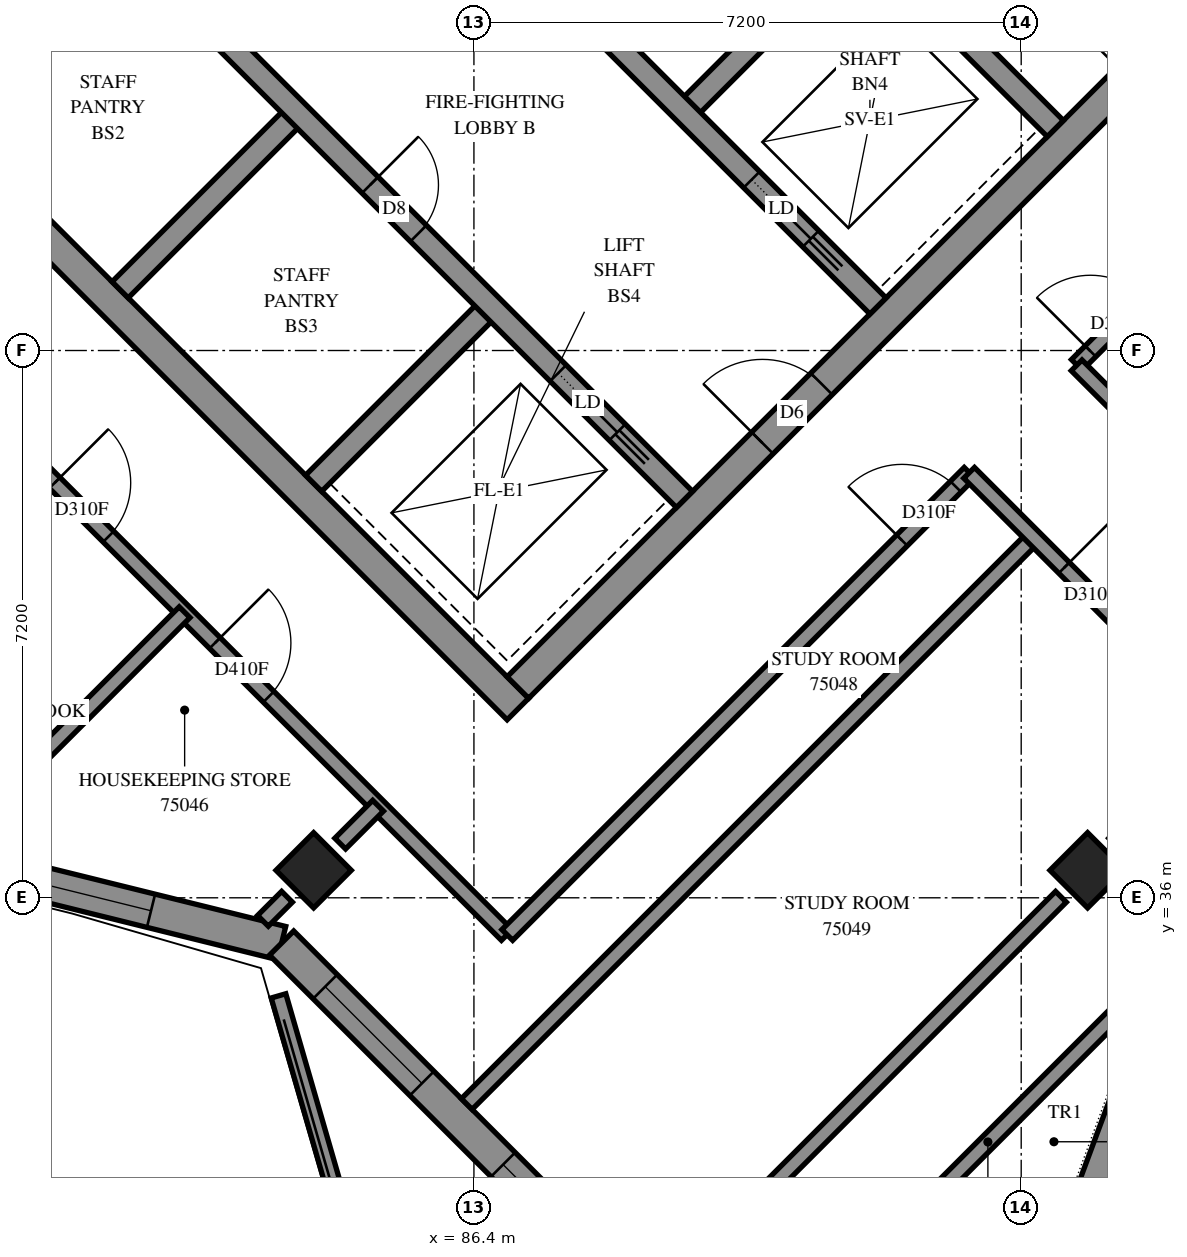
"""IFC4 building model, lengths in metres.
Left out: names, types, materials, properties, quantities, classifications, styles, units other than length and angle.
Written with IfcOpenShell. Run it as: python <this file> out.ifc"""

import sys

from ifc_helpers import new_model, si_unit, direction, frame, frame_2d, origin, origin_2d, place, context, subcontext, project, spatial, polyline, rectangle, outline, extrude, element, fill, save


model = new_model("IFC4")
c1 = context("Model", 3, precision=1e-05, world=origin(), true_north=direction((0.0, 1.0)))
c2 = subcontext(c1, "Body", "Model", "MODEL_VIEW")
j1 = project(units=[si_unit("LENGTHUNIT", "METRE"), si_unit("PLANEANGLEUNIT", "RADIAN")], contexts=[c1])
p1 = place(None, origin())
s1 = spatial("IfcSite", under=j1, at=p1, CompositionType="ELEMENT")
p2 = place(p1, origin())
s2 = spatial("IfcBuilding", under=s1, at=p2, CompositionType="ELEMENT")
p3 = place(p2, frame((0.0, 0.0, 274.4)))
s3 = spatial("IfcBuildingStorey", under=s2, at=p3, CompositionType="ELEMENT", Elevation=274.4)
for number, where, z_axis, x_axis in (
    (1, (84.291, 36.362, 0.0), (0.0, 0.0, 1.0), (0.707, -0.707, 0.0)),
    (2, (94.474, 36.362, 0.0), (0.0, 0.0, 1.0), (0.707, -0.707, 0.0)),
):
    element("IfcColumn", number, at=place(p3, frame(where, z_axis=z_axis, x_axis=x_axis)), inside=s3, PredefinedType="COLUMN", context=c2, shape_type="SweptSolid", body=[
        extrude(rectangle(XDim=0.7, YDim=0.7, at=origin_2d()), origin(), (0.0, 0.0, 1.0), 3.1),
    ])
p4 = place(p3, frame((76.23, 49.231, -0.3), z_axis=(0.0, 0.0, 1.0), x_axis=(0.7071034917, -0.7071100706, 0.0)))
e3 = element("IfcWall", 3, at=p4, inside=s3, PredefinedType="SHEAR", context=c2, shape_type="SweptSolid", body=[
    extrude(rectangle(XDim=15.2, YDim=0.4, at=frame_2d((7.6, 0.0))), origin(), (0.0, 0.0, 1.0), 2.7),
])
p5 = place(p3, frame((86.978, 38.766, -0.3), z_axis=(0.0, 0.0, 1.0), x_axis=(0.7071067812, 0.7071067812, 0.0)))
e4 = element("IfcWall", 4, at=p5, inside=s3, PredefinedType="SHEAR", context=c2, shape_type="SweptSolid", body=[
    extrude(rectangle(XDim=14.4, YDim=0.4, at=frame_2d((7.2, 0.0))), origin(), (0.0, 0.0, 1.0), 2.7),
])
p6 = place(p5, frame((4.55, 0.0, 0.3)))
e5 = element("IfcOpeningElement", 5, at=p6, cuts=e4, PredefinedType="OPENING", context=c2, shape_type="SweptSolid", body=[
    extrude(rectangle(XDim=1.1, YDim=2.1, at=frame_2d((0.55, 1.05))), frame((0.0, 0.21, 0.0), z_axis=(0.0, -1.0, 0.0), x_axis=(1.0, 0.0, 0.0)), (0.0, 0.0, 1.0), 0.42),
])
p7 = place(p5, frame((11.35, 0.0, 0.3)))
e6 = element("IfcOpeningElement", 6, at=p7, cuts=e4, PredefinedType="OPENING", context=c2, shape_type="SweptSolid", body=[
    extrude(rectangle(XDim=1.1, YDim=2.1, at=frame_2d((0.55, 1.05))), frame((0.0, 0.21, 0.0), z_axis=(0.0, -1.0, 0.0), x_axis=(1.0, 0.0, 0.0)), (0.0, 0.0, 1.0), 0.42),
])
p8 = place(p3, frame((79.2, 46.544, 0.0), z_axis=(0.0, 0.0, 1.0), x_axis=(0.7071219326, 0.7070916295, 0.0)))
e7 = element("IfcWall", 7, at=p8, inside=s3, PredefinedType="SOLIDWALL", context=c2, shape_type="SweptSolid", body=[
    extrude(rectangle(XDim=3.3, YDim=0.3, at=frame_2d((1.65, 0.0))), origin(), (0.0, 0.0, 1.0), 3.1),
])
for number, where, z_axis, x_axis in (
    (8, (81.746, 43.999, 0.0), (0.0, 0.0, 1.0), (0.707, 0.707, 0.0)),
    (9, (84.291, 41.453, 0.0), (0.0, 0.0, 1.0), (0.707, 0.707, 0.0)),
):
    element("IfcWall", number, at=place(p3, frame(where, z_axis=z_axis, x_axis=x_axis)), inside=s3, PredefinedType="SOLIDWALL", context=c2, shape_type="SweptSolid", body=[
        extrude(rectangle(XDim=3.3, YDim=0.3, at=frame_2d((1.65, 0.0))), origin(), (0.0, 0.0, 1.0), 3.1),
    ])
p9 = place(p3, frame((89.17, 46.332, 0.0), z_axis=(0.0, 0.0, 1.0), x_axis=(0.7071067812, 0.7071067812, 0.0)))
e10 = element("IfcWall", 10, at=p9, inside=s3, PredefinedType="SOLIDWALL", context=c2, shape_type="SweptSolid", body=[
    extrude(rectangle(XDim=3.3, YDim=0.3, at=frame_2d((1.65, 0.0))), origin(), (0.0, 0.0, 1.0), 3.1),
])
p10 = place(p3, frame((78.988, 51.423, 0.0), z_axis=(0.0, 0.0, 1.0), x_axis=(0.7071067812, -0.7071067812, 0.0)))
e11 = element("IfcWall", 11, at=p10, inside=s3, PredefinedType="SOLIDWALL", context=c2, shape_type="SweptSolid", body=[
    extrude(rectangle(XDim=14.4, YDim=0.3, at=frame_2d((7.2, 0.0))), origin(), (0.0, 0.0, 1.0), 3.1),
])
p11 = place(p10, frame((1.35, 0.0, 0.0)))
e12 = element("IfcOpeningElement", 12, at=p11, cuts=e11, PredefinedType="OPENING", context=c2, shape_type="SweptSolid", body=[
    extrude(rectangle(XDim=0.9, YDim=2.1, at=frame_2d((0.45, 1.05))), frame((0.0, 0.16, 0.0), z_axis=(0.0, -1.0, 0.0), x_axis=(1.0, 0.0, 0.0)), (0.0, 0.0, 1.0), 0.32),
])
p12 = place(p10, frame((4.95, 0.0, 0.0)))
e13 = element("IfcOpeningElement", 13, at=p12, cuts=e11, PredefinedType="OPENING", context=c2, shape_type="SweptSolid", body=[
    extrude(rectangle(XDim=0.9, YDim=2.1, at=frame_2d((0.45, 1.05))), frame((0.0, 0.16, 0.0), z_axis=(0.0, -1.0, 0.0), x_axis=(1.0, 0.0, 0.0)), (0.0, 0.0, 1.0), 0.32),
])
p13 = place(p10, frame((8.55, 0.0, 0.0)))
e14 = element("IfcOpeningElement", 14, at=p13, cuts=e11, PredefinedType="OPENING", context=c2, shape_type="SweptSolid", body=[
    extrude(rectangle(XDim=0.9, YDim=2.1, at=frame_2d((0.45, 1.05))), frame((0.0, 0.16, 0.0), z_axis=(0.0, -1.0, 0.0), x_axis=(1.0, 0.0, 0.0)), (0.0, 0.0, 1.0), 0.32),
])
p14 = place(p10, frame((12.05, 0.0, 0.0)))
e15 = element("IfcOpeningElement", 15, at=p14, cuts=e11, PredefinedType="OPENING", context=c2, shape_type="SweptSolid", body=[
    extrude(rectangle(XDim=1.1, YDim=2.1, at=frame_2d((0.55, 1.05))), frame((0.0, 0.16, 0.0), z_axis=(0.0, -1.0, 0.0), x_axis=(1.0, 0.0, 0.0)), (0.0, 0.0, 1.0), 0.32),
])
p15 = place(p3, frame((81.534, 53.969, 0.0), z_axis=(0.0, 0.0, 1.0), x_axis=(0.707103309, -0.7071102534, 0.0)))
e16 = element("IfcWall", 16, at=p15, inside=s3, PredefinedType="SOLIDWALL", context=c2, shape_type="SweptSolid", body=[
    extrude(rectangle(XDim=14.4, YDim=0.3, at=frame_2d((7.2, 0.0))), origin(), (0.0, 0.0, 1.0), 3.1),
])
p16 = place(p15, frame((8.55, 0.0, 0.0)))
e17 = element("IfcOpeningElement", 17, at=p16, cuts=e16, PredefinedType="OPENING", context=c2, shape_type="SweptSolid", body=[
    extrude(rectangle(XDim=0.9, YDim=2.1, at=frame_2d((0.45, 1.05))), frame((0.0, 0.16, 0.0), z_axis=(0.0, -1.0, 0.0), x_axis=(1.0, 0.0, 0.0)), (0.0, 0.0, 1.0), 0.32),
])
p17 = place(p15, frame((1.25, 0.0, 0.0)))
e18 = element("IfcOpeningElement", 18, at=p17, cuts=e16, PredefinedType="OPENING", context=c2, shape_type="SweptSolid", body=[
    extrude(rectangle(XDim=1.1, YDim=2.1, at=frame_2d((0.55, 1.05))), frame((0.0, 0.16, 0.0), z_axis=(0.0, -1.0, 0.0), x_axis=(1.0, 0.0, 0.0)), (0.0, 0.0, 1.0), 0.32),
])
p18 = place(p15, frame((4.85, 0.0, 0.0)))
e19 = element("IfcOpeningElement", 19, at=p18, cuts=e16, PredefinedType="OPENING", context=c2, shape_type="SweptSolid", body=[
    extrude(rectangle(XDim=1.1, YDim=2.1, at=frame_2d((0.55, 1.05))), frame((0.0, 0.16, 0.0), z_axis=(0.0, -1.0, 0.0), x_axis=(1.0, 0.0, 0.0)), (0.0, 0.0, 1.0), 0.32),
])
p19 = place(p15, frame((12.05, 0.0, 0.0)))
e20 = element("IfcOpeningElement", 20, at=p19, cuts=e16, PredefinedType="OPENING", context=c2, shape_type="SweptSolid", body=[
    extrude(rectangle(XDim=1.1, YDim=2.1, at=frame_2d((0.55, 1.05))), frame((0.0, 0.16, 0.0), z_axis=(0.0, -1.0, 0.0), x_axis=(1.0, 0.0, 0.0)), (0.0, 0.0, 1.0), 0.32),
])
p20 = place(p3, frame((88.958, 51.211, 0.0), z_axis=(0.0, 0.0, 1.0), x_axis=(0.7070998367, -0.7071137256, 0.0)))
e21 = element("IfcWall", 21, at=p20, inside=s3, PredefinedType="SOLIDWALL", context=c2, shape_type="SweptSolid", body=[
    extrude(rectangle(XDim=7.2, YDim=0.3, at=frame_2d((3.6, 0.0))), origin(), (0.0, 0.0, 1.0), 3.1),
])
p21 = place(p3, frame((94.3, 31.45, 0.0), z_axis=(0.0, 0.0, 1.0), x_axis=(0.3481927166, 0.9374229739, 0.0)))
e22 = element("IfcWall", 22, at=p21, inside=s3, PredefinedType="SOLIDWALL", context=c2, shape_type="SweptSolid", body=[
    extrude(outline(polyline([(-0.108, -0.225), (5.172, -0.225), (5.379, 0.225), (0.108, 0.225), (-0.108, -0.225)])), origin(), (0.0, 0.0, 1.0), 3.1),
])
p22 = place(p21, frame((2.034, 0.0, 0.7)))
e23 = element("IfcOpeningElement", 23, at=p22, cuts=e22, PredefinedType="OPENING", context=c2, shape_type="SweptSolid", body=[
    extrude(rectangle(XDim=1.8, YDim=1.8, at=frame_2d((0.9, 0.9))), frame((0.0, 0.235, 0.0), z_axis=(0.0, -1.0, 0.0), x_axis=(1.0, 0.0, 0.0)), (0.0, 0.0, 1.0), 0.47),
])
p23 = place(p3, frame((79.43, 36.503, 0.0), z_axis=(0.0, 0.0, 1.0), x_axis=(0.9707070317, -0.2402662245, 0.0)))
e24 = element("IfcWall", 24, at=p23, inside=s3, PredefinedType="SOLIDWALL", context=c2, shape_type="SweptSolid", body=[
    extrude(outline(polyline([(-0.136, -0.225), (4.511, -0.225), (4.636, 0.225), (0.136, 0.225), (-0.136, -0.225)])), origin(), (0.0, 0.0, 1.0), 2.6),
])
p24 = place(p23, frame((1.004, 0.0, 0.6)))
e25 = element("IfcOpeningElement", 25, at=p24, cuts=e24, PredefinedType="OPENING", context=c2, shape_type="SweptSolid", body=[
    extrude(rectangle(XDim=1.8, YDim=1.9, at=frame_2d((0.9, 0.95))), frame((0.0, 0.235, 0.0), z_axis=(0.0, -1.0, 0.0), x_axis=(1.0, 0.0, 0.0)), (0.0, 0.0, 1.0), 0.47),
])
p25 = place(p3, frame((83.87, 35.404, 0.0), z_axis=(0.0, 0.0, 1.0), x_axis=(0.7071067812, -0.7071067812, 0.0)))
e26 = element("IfcWall", 26, at=p25, inside=s3, PredefinedType="SOLIDWALL", context=c2, shape_type="SweptSolid", body=[
    extrude(outline(polyline([(0.063, -0.225), (8.021, -0.225), (7.743, 0.225), (-0.063, 0.225), (0.063, -0.225)])), origin(), (0.0, 0.0, 1.0), 3.1),
])
p26 = place(p25, frame((0.81, 0.0, 0.7)))
e27 = element("IfcOpeningElement", 27, at=p26, cuts=e26, PredefinedType="OPENING", context=c2, shape_type="SweptSolid", body=[
    extrude(rectangle(XDim=1.8, YDim=1.8, at=frame_2d((0.9, 0.9))), frame((0.0, 0.235, 0.0), z_axis=(0.0, -1.0, 0.0), x_axis=(1.0, 0.0, 0.0)), (0.0, 0.0, 1.0), 0.47),
])
p27 = place(p25, frame((4.121, 0.0, 0.7)))
e28 = element("IfcOpeningElement", 28, at=p27, cuts=e26, PredefinedType="OPENING", context=c2, shape_type="SweptSolid", body=[
    extrude(rectangle(XDim=1.8, YDim=1.8, at=frame_2d((0.9, 0.9))), frame((0.0, 0.235, 0.0), z_axis=(0.0, -1.0, 0.0), x_axis=(1.0, 0.0, 0.0)), (0.0, 0.0, 1.0), 0.47),
])
p28 = place(p3, frame((95.381, 35.007, 0.0), z_axis=(0.0, 0.0, 1.0), x_axis=(-0.7071067812, -0.7071067812, 0.0)))
e29 = element("IfcWall", 29, at=p28, inside=s3, PredefinedType="PARAPET", context=c2, shape_type="SweptSolid", body=[
    extrude(outline(polyline([(0.0, -0.1), (6.277, -0.1), (6.277, 0.1), (0.0, 0.1), (0.0, -0.1)])), origin(), (0.0, 0.0, 1.0), 0.25),
])
p29 = place(p3, frame((86.306, 33.287, 0.0), z_axis=(0.0, 0.0, 1.0), x_axis=(0.7071020418, 0.7071115206, 0.0)))
e30 = element("IfcWall", 30, at=p29, inside=s3, PredefinedType="PARTITIONING", context=c2, shape_type="SweptSolid", body=[
    extrude(rectangle(XDim=10.55, YDim=0.2, at=frame_2d((5.275, 0.0))), origin(), (0.0, 0.0, 1.0), 3.1),
])
p30 = place(p3, frame((80.747, 41.597, 0.0), z_axis=(0.0, 0.0, 1.0), x_axis=(0.7071067812, -0.7071067812, 0.0)))
e31 = element("IfcWall", 31, at=p30, inside=s3, PredefinedType="PARTITIONING", context=c2, shape_type="SweptSolid", body=[
    extrude(rectangle(XDim=8.607, YDim=0.2, at=frame_2d((4.303, 0.0))), origin(), (0.0, 0.0, 1.0), 3.1),
])
p31 = place(p30, frame((0.195, 0.0, 0.0)))
e32 = element("IfcOpeningElement", 32, at=p31, cuts=e31, PredefinedType="OPENING", context=c2, shape_type="SweptSolid", body=[
    extrude(rectangle(XDim=1.0, YDim=2.1, at=frame_2d((0.5, 1.05))), frame((0.0, 0.11, 0.0), z_axis=(0.0, -1.0, 0.0), x_axis=(1.0, 0.0, 0.0)), (0.0, 0.0, 1.0), 0.22),
])
p32 = place(p30, frame((3.175, 0.0, 0.0)))
e33 = element("IfcOpeningElement", 33, at=p32, cuts=e31, PredefinedType="OPENING", context=c2, shape_type="SweptSolid", body=[
    extrude(rectangle(XDim=1.0, YDim=2.1, at=frame_2d((0.5, 1.05))), frame((0.0, 0.11, 0.0), z_axis=(0.0, -1.0, 0.0), x_axis=(1.0, 0.0, 0.0)), (0.0, 0.0, 1.0), 0.22),
])
p33 = place(p3, frame((86.839, 35.511, 0.0), z_axis=(0.0, 0.0, 1.0), x_axis=(0.707223053, 0.7069904903, 0.0)))
e34 = element("IfcWall", 34, at=p33, inside=s3, PredefinedType="PARTITIONING", context=c2, shape_type="SweptSolid", body=[
    extrude(rectangle(XDim=8.6, YDim=0.2, at=frame_2d((4.3, 0.0))), origin(), (0.0, 0.0, 1.0), 3.1),
])
p34 = place(p33, frame((7.343, 0.0, 0.0)))
e35 = element("IfcOpeningElement", 35, at=p34, cuts=e34, PredefinedType="OPENING", context=c2, shape_type="SweptSolid", body=[
    extrude(rectangle(XDim=1.0, YDim=2.1, at=frame_2d((0.5, 1.05))), frame((0.0, 0.11, 0.0), z_axis=(0.0, -1.0, 0.0), x_axis=(1.0, 0.0, 0.0)), (0.0, 0.0, 1.0), 0.22),
])
p35 = place(p3, frame((94.332, 43.01, 0.0), z_axis=(0.0, 0.0, 1.0), x_axis=(0.7071067812, 0.7071067812, 0.0)))
e36 = element("IfcWall", 36, at=p35, inside=s3, PredefinedType="PARTITIONING", context=c2, shape_type="SweptSolid", body=[
    extrude(rectangle(XDim=8.598, YDim=0.2, at=frame_2d((4.299, 0.0))), origin(), (0.0, 0.0, 1.0), 3.1),
])
p36 = place(p35, frame((0.255, 0.0, 0.0)))
e37 = element("IfcOpeningElement", 37, at=p36, cuts=e36, PredefinedType="OPENING", context=c2, shape_type="SweptSolid", body=[
    extrude(rectangle(XDim=1.0, YDim=2.1, at=frame_2d((0.5, 1.05))), frame((0.0, 0.11, 0.0), z_axis=(0.0, -1.0, 0.0), x_axis=(1.0, 0.0, 0.0)), (0.0, 0.0, 1.0), 0.22),
])
p37 = place(p3, frame((89.731, 31.621, 0.0), z_axis=(0.0, 0.0, 1.0), x_axis=(0.7071067812, 0.7071067812, 0.0)))
e38 = element("IfcWall", 38, at=p37, inside=s3, PredefinedType="PARTITIONING", context=c2, shape_type="SweptSolid", body=[
    extrude(rectangle(XDim=6.211, YDim=0.2, at=frame_2d((3.106, 0.0))), origin(), (0.0, 0.0, 1.0), 2.6),
])
p38 = place(p3, frame((92.915, 41.591, 0.0), z_axis=(0.0, 0.0, 1.0), x_axis=(0.7071067812, -0.7071067812, 0.0)))
e39 = element("IfcWall", 39, at=p38, inside=s3, PredefinedType="PARTITIONING", context=c2, shape_type="SweptSolid", body=[
    extrude(rectangle(XDim=4.8, YDim=0.2, at=frame_2d((2.4, 0.0))), origin(), (0.0, 0.0, 1.0), 3.1),
])
p39 = place(p38, frame((1.767, 0.0, 0.0)))
e40 = element("IfcOpeningElement", 40, at=p39, cuts=e39, PredefinedType="OPENING", context=c2, shape_type="SweptSolid", body=[
    extrude(rectangle(XDim=1.0, YDim=2.1, at=frame_2d((0.5, 1.05))), frame((0.0, 0.11, 0.0), z_axis=(0.0, -1.0, 0.0), x_axis=(1.0, 0.0, 0.0)), (0.0, 0.0, 1.0), 0.22),
])
p40 = place(p3, frame((94.329, 43.005, 0.0), z_axis=(0.0, 0.0, 1.0), x_axis=(0.7071067812, -0.7071067812, 0.0)))
e41 = element("IfcWall", 41, at=p40, inside=s3, PredefinedType="PARTITIONING", context=c2, shape_type="SweptSolid", body=[
    extrude(rectangle(XDim=4.8, YDim=0.2, at=frame_2d((2.4, 0.0))), origin(), (0.0, 0.0, 1.0), 3.1),
])
p41 = place(p40, frame((1.725, 0.0, 0.0)))
e42 = element("IfcOpeningElement", 42, at=p41, cuts=e41, PredefinedType="OPENING", context=c2, shape_type="SweptSolid", body=[
    extrude(rectangle(XDim=1.0, YDim=2.1, at=frame_2d((0.5, 1.05))), frame((0.0, 0.11, 0.0), z_axis=(0.0, -1.0, 0.0), x_axis=(1.0, 0.0, 0.0)), (0.0, 0.0, 1.0), 0.22),
])
p42 = place(p3, frame((79.598, 36.761, 0.0), z_axis=(0.0, 0.0, 1.0), x_axis=(0.7071067812, 0.7071067812, 0.0)))
e43 = element("IfcWall", 43, at=p42, inside=s3, PredefinedType="PARTITIONING", context=c2, shape_type="SweptSolid", body=[
    extrude(rectangle(XDim=4.236, YDim=0.2, at=frame_2d((2.118, 0.0))), origin(), (0.0, 0.0, 1.0), 3.1),
])
p43 = place(p3, frame((84.641, 36.713, 0.0), z_axis=(0.0, 0.0, 1.0), x_axis=(0.7071067812, 0.7071067812, 0.0)))
e44 = element("IfcWall", 44, at=p43, inside=s3, PredefinedType="PARTITIONING", context=c2, shape_type="SweptSolid", body=[
    extrude(rectangle(XDim=0.704, YDim=0.2, at=frame_2d((0.352, 0.0))), origin(), (0.0, 0.0, 1.0), 3.1),
])
p44 = place(p3, frame((83.624, 35.697, 0.0), z_axis=(0.0, 0.0, 1.0), x_axis=(0.7069950475, 0.7072184972, 0.0)))
e45 = element("IfcWall", 45, at=p44, inside=s3, PredefinedType="PARTITIONING", context=c2, shape_type="SweptSolid", body=[
    extrude(rectangle(XDim=0.448, YDim=0.2, at=frame_2d((0.224, 0.0))), origin(), (0.0, 0.0, 1.0), 2.6),
])
p45 = place(p3, frame((84.979, 30.731, 0.0), z_axis=(0.0, 0.0, 1.0), x_axis=(-0.2777555576, 0.9606517841, 0.0)))
e46 = element("IfcWall", 46, at=p45, inside=s3, PredefinedType="PARAPET", context=c2, shape_type="SweptSolid", body=[
    extrude(rectangle(XDim=4.142, YDim=0.2, at=frame_2d((2.071, 0.0))), origin(), (0.0, 0.0, 1.0), 0.2),
])
p46 = place(p24, origin())
e47 = element("IfcWindow", 47, at=p46, inside=s3, PartitioningType="SINGLE_PANEL", PredefinedType="WINDOW", context=c2, shape_type="SweptSolid", body=[
    extrude(rectangle(XDim=1.8, YDim=1.9, at=frame_2d((0.9, 0.95))), frame((0.0, 0.205, 0.0), z_axis=(0.0, -1.0, 0.0), x_axis=(1.0, 0.0, 0.0)), (0.0, 0.0, 1.0), 0.06),
])
fill(e25, e47)
p47 = place(p26, origin())
e48 = element("IfcWindow", 48, at=p47, inside=s3, PartitioningType="SINGLE_PANEL", PredefinedType="WINDOW", context=c2, shape_type="SweptSolid", body=[
    extrude(rectangle(XDim=1.8, YDim=1.8, at=frame_2d((0.9, 0.9))), frame((0.0, 0.205, 0.0), z_axis=(0.0, -1.0, 0.0), x_axis=(1.0, 0.0, 0.0)), (0.0, 0.0, 1.0), 0.06),
])
fill(e27, e48)
p48 = place(p27, origin())
e49 = element("IfcWindow", 49, at=p48, inside=s3, PartitioningType="SINGLE_PANEL", PredefinedType="WINDOW", context=c2, shape_type="SweptSolid", body=[
    extrude(rectangle(XDim=1.8, YDim=1.8, at=frame_2d((0.9, 0.9))), frame((0.0, 0.205, 0.0), z_axis=(0.0, -1.0, 0.0), x_axis=(1.0, 0.0, 0.0)), (0.0, 0.0, 1.0), 0.06),
])
fill(e28, e49)
p49 = place(p6, origin())
e50 = element("IfcDoor", 50, at=p49, inside=s3, OperationType="DOUBLE_DOOR_SINGLE_SWING", PredefinedType="DOOR", context=c2, shape_type="SweptSolid", body=[
    extrude(rectangle(XDim=1.1, YDim=2.1, at=frame_2d((0.55, 1.05))), frame((0.0, 0.025, 0.0), z_axis=(0.0, -1.0, 0.0), x_axis=(1.0, 0.0, 0.0)), (0.0, 0.0, 1.0), 0.05),
])
fill(e5, e50)
p50 = place(p13, origin())
e51 = element("IfcDoor", 51, at=p50, inside=s3, OperationType="SINGLE_SWING_LEFT", PredefinedType="DOOR", context=c2, shape_type="SweptSolid", body=[
    extrude(rectangle(XDim=0.9, YDim=2.1, at=frame_2d((0.45, 1.05))), frame((0.0, 0.025, 0.0), z_axis=(0.0, -1.0, 0.0), x_axis=(1.0, 0.0, 0.0)), (0.0, 0.0, 1.0), 0.05),
])
fill(e14, e51)
p51 = place(p14, origin())
e52 = element("IfcDoor", 52, at=p51, inside=s3, OperationType="SLIDING_TO_RIGHT", PredefinedType="DOOR", context=c2, shape_type="SweptSolid", body=[
    extrude(rectangle(XDim=1.1, YDim=2.1, at=frame_2d((0.55, 1.05))), frame((0.0, 0.025, 0.0), z_axis=(0.0, -1.0, 0.0), x_axis=(1.0, 0.0, 0.0)), (0.0, 0.0, 1.0), 0.05),
])
fill(e15, e52)
p52 = place(p19, origin())
e53 = element("IfcDoor", 53, at=p52, inside=s3, OperationType="SLIDING_TO_RIGHT", PredefinedType="DOOR", context=c2, shape_type="SweptSolid", body=[
    extrude(rectangle(XDim=1.1, YDim=2.1, at=frame_2d((0.55, 1.05))), frame((0.0, 0.025, 0.0), z_axis=(0.0, -1.0, 0.0), x_axis=(1.0, 0.0, 0.0)), (0.0, 0.0, 1.0), 0.05),
])
fill(e20, e53)
p53 = place(p31, origin())
e54 = element("IfcDoor", 54, at=p53, inside=s3, OperationType="SINGLE_SWING_LEFT", PredefinedType="DOOR", context=c2, shape_type="SweptSolid", body=[
    extrude(rectangle(XDim=1.0, YDim=2.1, at=frame_2d((0.5, 1.05))), frame((0.0, 0.025, 0.0), z_axis=(0.0, -1.0, 0.0), x_axis=(1.0, 0.0, 0.0)), (0.0, 0.0, 1.0), 0.05),
])
fill(e32, e54)
p54 = place(p32, origin())
e55 = element("IfcDoor", 55, at=p54, inside=s3, OperationType="SINGLE_SWING_LEFT", PredefinedType="DOOR", context=c2, shape_type="SweptSolid", body=[
    extrude(rectangle(XDim=1.0, YDim=2.1, at=frame_2d((0.5, 1.05))), frame((0.0, 0.025, 0.0), z_axis=(0.0, -1.0, 0.0), x_axis=(1.0, 0.0, 0.0)), (0.0, 0.0, 1.0), 0.05),
])
fill(e33, e55)
p55 = place(p36, origin())
e56 = element("IfcDoor", 56, at=p55, inside=s3, OperationType="SINGLE_SWING_RIGHT", PredefinedType="DOOR", context=c2, shape_type="SweptSolid", body=[
    extrude(rectangle(XDim=1.0, YDim=2.1, at=frame_2d((0.5, 1.05))), frame((0.0, 0.025, 0.0), z_axis=(0.0, -1.0, 0.0), x_axis=(1.0, 0.0, 0.0)), (0.0, 0.0, 1.0), 0.05),
])
fill(e37, e56)
p56 = place(p34, origin())
e57 = element("IfcDoor", 57, at=p56, inside=s3, OperationType="SINGLE_SWING_RIGHT", PredefinedType="DOOR", context=c2, shape_type="SweptSolid", body=[
    extrude(rectangle(XDim=1.0, YDim=2.1, at=frame_2d((0.5, 1.05))), frame((0.0, 0.025, 0.0), z_axis=(0.0, -1.0, 0.0), x_axis=(1.0, 0.0, 0.0)), (0.0, 0.0, 1.0), 0.05),
])
fill(e35, e57)
p57 = place(p39, origin())
e58 = element("IfcDoor", 58, at=p57, inside=s3, OperationType="SINGLE_SWING_LEFT", PredefinedType="DOOR", context=c2, shape_type="SweptSolid", body=[
    extrude(rectangle(XDim=1.0, YDim=2.1, at=frame_2d((0.5, 1.05))), frame((0.0, 0.025, 0.0), z_axis=(0.0, -1.0, 0.0), x_axis=(1.0, 0.0, 0.0)), (0.0, 0.0, 1.0), 0.05),
])
fill(e40, e58)
save(model, sys.argv[1])
